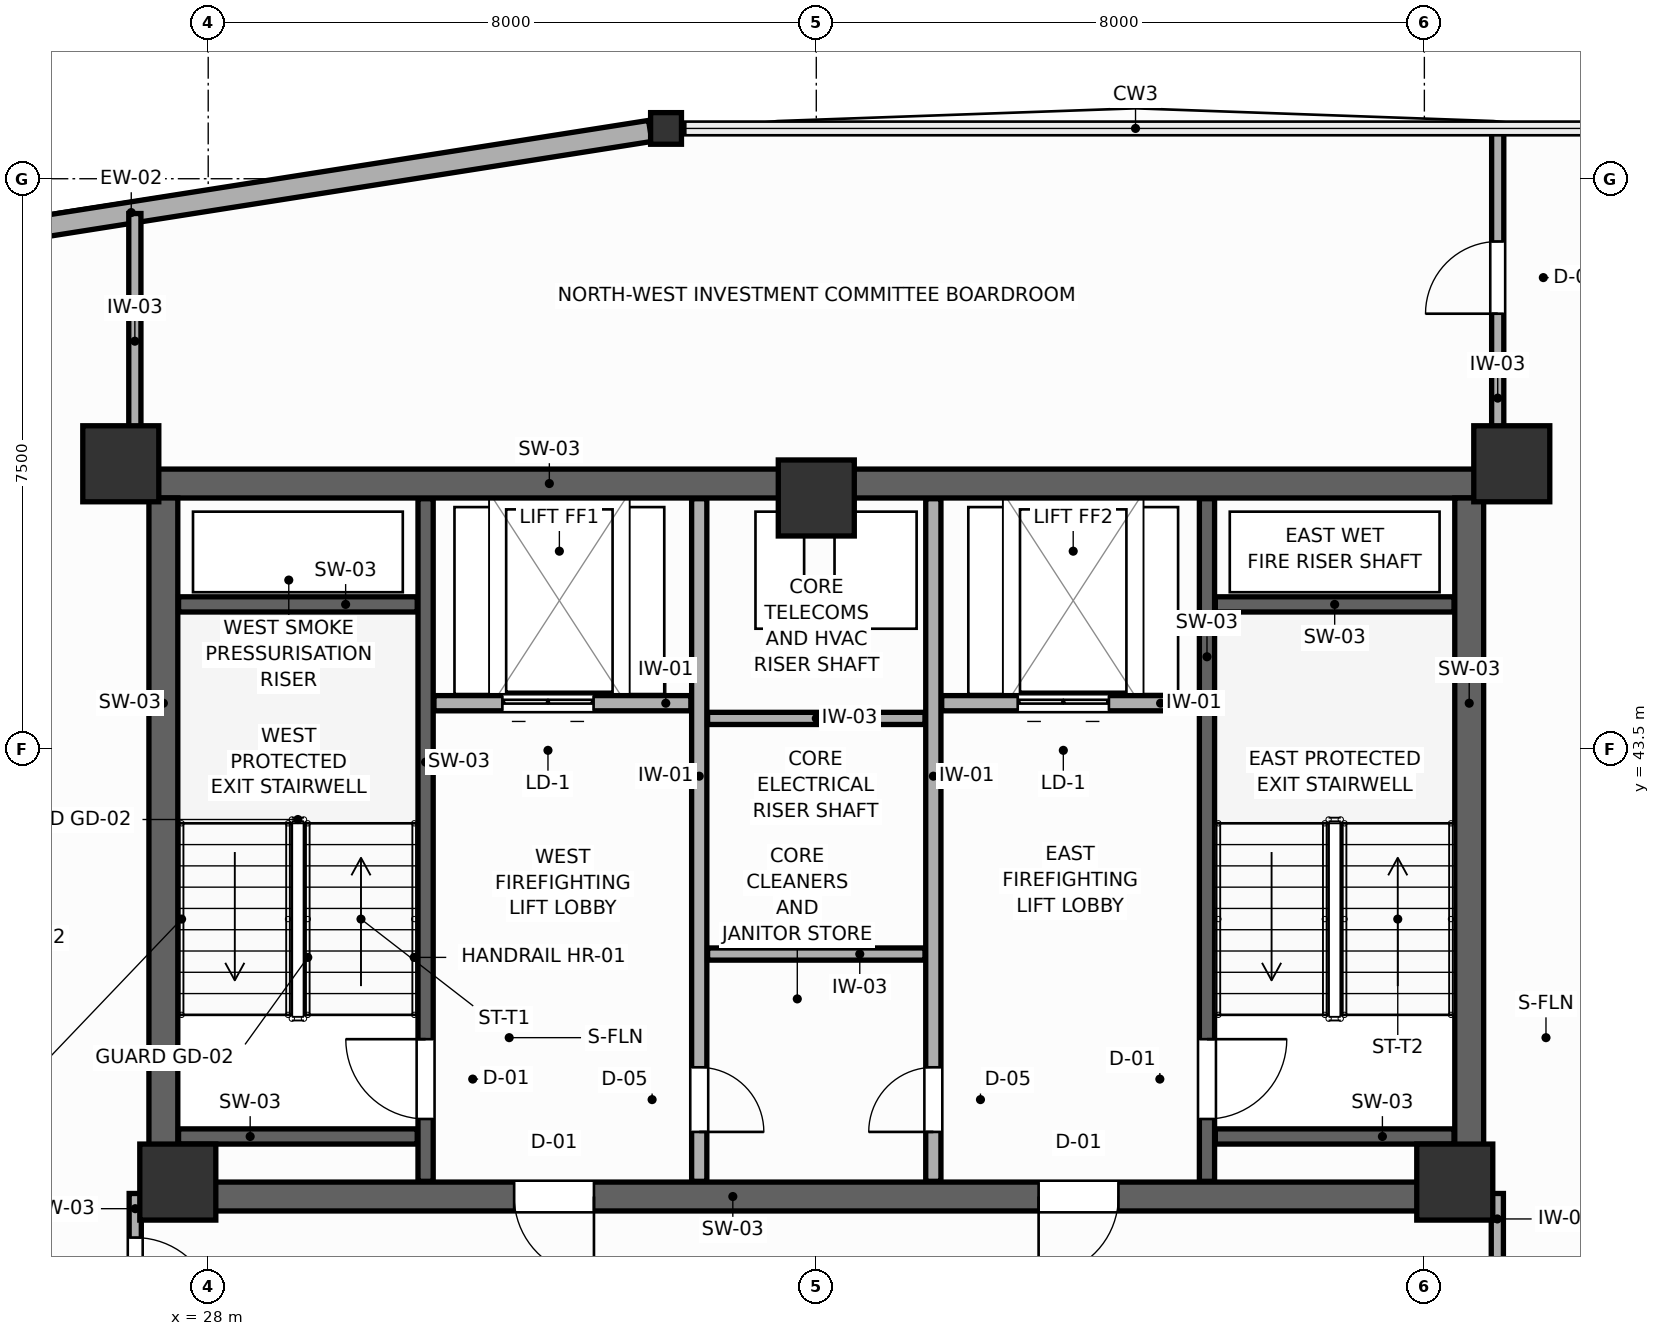
"""IFC4 building model, lengths in metres.
Left out: names, types, materials, properties, quantities, classifications, styles, units other than length and angle.
Written with IfcOpenShell. Run it as: python <this file> out.ifc"""

import sys

from ifc_helpers import new_model, si_unit, direction, frame, frame_2d, origin, origin_2d, place, context, subcontext, project, spatial, rectangle, i_section, extrude, source, transform, mapped, element, fill, save


model = new_model("IFC4")
c1 = context("Model", 3, precision=1e-05, world=origin(), true_north=direction((0.0, 1.0)))
c2 = subcontext(c1, "Body", "Model", "MODEL_VIEW")
j1 = project(units=[si_unit("LENGTHUNIT", "METRE"), si_unit("PLANEANGLEUNIT", "RADIAN")], contexts=[c1])
p1 = place(None, origin())
s1 = spatial("IfcSite", under=j1, at=p1, CompositionType="ELEMENT")
p2 = place(p1, origin())
s2 = spatial("IfcBuilding", under=s1, at=p2, CompositionType="ELEMENT")
p3 = place(p2, frame((0.0, 0.0, 213.0)))
s3 = spatial("IfcBuildingStorey", under=s2, at=p3, CompositionType="ELEMENT", Elevation=213.0)
p4 = place(p3, frame((27.22, 46.99, 0.0), z_axis=(0.0, 0.0, 1.0), x_axis=(1.0, 0.0, 0.0)))
e1 = element("IfcWall", 1, at=p4, inside=s3, PredefinedType="SHEAR", context=c2, shape_type="SweptSolid", body=[
    extrude(rectangle(XDim=17.56, YDim=0.38, at=frame_2d((8.78, 0.0))), origin(), (0.0, 0.0, 1.0), 3.6),
])
p5 = place(p3, frame((27.22, 37.61, 0.0), z_axis=(0.0, 0.0, 1.0), x_axis=(1.0, 0.0, 0.0)))
e2 = element("IfcWall", 2, at=p5, inside=s3, PredefinedType="SHEAR", context=c2, shape_type="SweptSolid", body=[
    extrude(rectangle(XDim=17.56, YDim=0.38, at=frame_2d((8.78, 0.0))), origin(), (0.0, 0.0, 1.0), 3.6),
])
p6 = place(p5, frame((4.805, 0.0, 0.0)))
e3 = element("IfcOpeningElement", 3, at=p6, cuts=e2, PredefinedType="OPENING", context=c2, shape_type="SweptSolid", body=[
    extrude(rectangle(XDim=1.05, YDim=2.1, at=frame_2d((0.525, 1.05))), frame((0.0, 0.2, 0.0), z_axis=(0.0, -1.0, 0.0), x_axis=(1.0, 0.0, 0.0)), (0.0, 0.0, 1.0), 0.4),
])
p7 = place(p5, frame((11.705, 0.0, 0.0)))
e4 = element("IfcOpeningElement", 4, at=p7, cuts=e2, PredefinedType="OPENING", context=c2, shape_type="SweptSolid", body=[
    extrude(rectangle(XDim=1.05, YDim=2.1, at=frame_2d((0.525, 1.05))), frame((0.0, 0.2, 0.0), z_axis=(0.0, -1.0, 0.0), x_axis=(1.0, 0.0, 0.0)), (0.0, 0.0, 1.0), 0.4),
])
for number, where, z_axis, x_axis in (
    (5, (27.41, 37.8, 0.0), (0.0, 0.0, 1.0), (0.0, 1.0, 0.0)),
    (6, (44.59, 37.8, 0.0), (0.0, 0.0, 1.0), (0.0, 1.0, 0.0)),
):
    element("IfcWall", number, at=place(p3, frame(where, z_axis=z_axis, x_axis=x_axis)), inside=s3, PredefinedType="SHEAR", context=c2, shape_type="SweptSolid", body=[
        extrude(rectangle(XDim=9.0, YDim=0.38, at=frame_2d((4.5, 0.0))), origin(), (0.0, 0.0, 1.0), 3.6),
    ])
m1 = source(origin(), c2, "Body", "SweptSolid", [
    extrude(rectangle(XDim=1.0, YDim=1.0, at=origin_2d()), origin(), (0.0, 0.0, 1.0), 3.6),
])
for number, where, z_axis, x_axis in (
    (7, (26.85, 47.25, 0.0), (0.0, 0.0, 1.0), (1.0, 0.0, 0.0)),
    (8, (45.15, 47.25, 0.0), (0.0, 0.0, 1.0), (1.0, 0.0, 0.0)),
    (9, (27.6, 37.8, 0.0), (0.0, 0.0, 1.0), (1.0, 0.0, 0.0)),
    (10, (44.4, 37.8, 0.0), (0.0, 0.0, 1.0), (1.0, 0.0, 0.0)),
    (11, (36.0, 46.8, 0.0), (0.0, 0.0, 1.0), (1.0, 0.0, 0.0)),
):
    element("IfcColumn", number, at=place(p3, frame(where, z_axis=z_axis, x_axis=x_axis)), inside=s3, PredefinedType="COLUMN", context=c2, shape_type="MappedRepresentation", body=[
        mapped(m1, transform((0.0, 0.0, 0.0), scale=1.0)),
    ])
m2 = source(origin(), c2, "Body", "SweptSolid", [
    extrude(i_section(OverallWidth=0.406, OverallDepth=0.416, WebThickness=0.027, FlangeThickness=0.044, FilletRadius=0.015, at=origin_2d()), origin(), (0.0, 0.0, 1.0), 3.6),
])
p8 = place(p3, frame((34.023, 51.662, 0.0), z_axis=(0.0, 0.0, 1.0), x_axis=(1.0, 0.0, 0.0)))
e12 = element("IfcColumn", 12, at=p8, inside=s3, PredefinedType="COLUMN", context=c2, shape_type="MappedRepresentation", body=[
    mapped(m2, transform((0.0, 0.0, 0.0), scale=1.0)),
])
p9 = place(p3, frame((33.815, 51.629, 0.0), z_axis=(0.0, 0.0, 1.0), x_axis=(-0.987848165878, -0.155422009936, 0.0)))
e13 = element("IfcWall", 13, at=p9, inside=s3, PredefinedType="SOLIDWALL", context=c2, shape_type="SweptSolid", body=[
    extrude(rectangle(XDim=13.823, YDim=0.28, at=frame_2d((6.912, 0.0))), origin(), (0.0, 0.0, 1.0), 1.88),
])
p10 = place(p3, frame((30.86, 37.81, 0.0), z_axis=(0.0, 0.0, 1.0), x_axis=(0.0, 1.0, 0.0)))
e14 = element("IfcWall", 14, at=p10, inside=s3, PredefinedType="SHEAR", context=c2, shape_type="SweptSolid", body=[
    extrude(rectangle(XDim=8.98, YDim=0.2, at=frame_2d((4.49, 0.0))), origin(), (0.0, 0.0, 1.0), 3.6),
])
p11 = place(p10, frame((0.82, 0.0, 0.0)))
e15 = element("IfcOpeningElement", 15, at=p11, cuts=e14, PredefinedType="OPENING", context=c2, shape_type="SweptSolid", body=[
    extrude(rectangle(XDim=1.05, YDim=2.1, at=frame_2d((0.525, 1.05))), frame((0.0, 0.11, 0.0), z_axis=(0.0, -1.0, 0.0), x_axis=(1.0, 0.0, 0.0)), (0.0, 0.0, 1.0), 0.22),
])
for number, where, z_axis, x_axis in (
    (16, (27.61, 45.4, 0.0), (0.0, 0.0, 1.0), (1.0, 0.0, 0.0)),
    (17, (27.61, 38.4, 0.0), (0.0, 0.0, 1.0), (1.0, 0.0, 0.0)),
):
    element("IfcWall", number, at=place(p3, frame(where, z_axis=z_axis, x_axis=x_axis)), inside=s3, PredefinedType="SHEAR", context=c2, shape_type="SweptSolid", body=[
        extrude(rectangle(XDim=3.14, YDim=0.2, at=frame_2d((1.57, 0.0))), origin(), (0.0, 0.0, 1.0), 3.6),
    ])
p12 = place(p3, frame((41.14, 37.81, 0.0), z_axis=(0.0, 0.0, 1.0), x_axis=(0.0, 1.0, 0.0)))
e18 = element("IfcWall", 18, at=p12, inside=s3, PredefinedType="SHEAR", context=c2, shape_type="SweptSolid", body=[
    extrude(rectangle(XDim=8.98, YDim=0.2, at=frame_2d((4.49, 0.0))), origin(), (0.0, 0.0, 1.0), 3.6),
])
p13 = place(p12, frame((0.82, 0.0, 0.0)))
e19 = element("IfcOpeningElement", 19, at=p13, cuts=e18, PredefinedType="OPENING", context=c2, shape_type="SweptSolid", body=[
    extrude(rectangle(XDim=1.05, YDim=2.1, at=frame_2d((0.525, 1.05))), frame((0.0, 0.11, 0.0), z_axis=(0.0, -1.0, 0.0), x_axis=(1.0, 0.0, 0.0)), (0.0, 0.0, 1.0), 0.22),
])
for number, where, z_axis, x_axis in (
    (20, (41.25, 45.4, 0.0), (0.0, 0.0, 1.0), (1.0, 0.0, 0.0)),
    (21, (41.25, 38.4, 0.0), (0.0, 0.0, 1.0), (1.0, 0.0, 0.0)),
):
    element("IfcWall", number, at=place(p3, frame(where, z_axis=z_axis, x_axis=x_axis)), inside=s3, PredefinedType="SHEAR", context=c2, shape_type="SweptSolid", body=[
        extrude(rectangle(XDim=3.14, YDim=0.2, at=frame_2d((1.57, 0.0))), origin(), (0.0, 0.0, 1.0), 3.6),
    ])
p14 = place(p3, frame((30.97, 44.1, 0.0), z_axis=(0.0, 0.0, 1.0), x_axis=(1.0, 0.0, 0.0)))
e22 = element("IfcWall", 22, at=p14, inside=s3, PredefinedType="PARTITIONING", context=c2, shape_type="SweptSolid", body=[
    extrude(rectangle(XDim=3.38, YDim=0.2, at=frame_2d((1.69, 0.0))), origin(), (0.0, 0.0, 1.0), 3.41),
])
p15 = place(p14, frame((0.9, 0.0, 0.0)))
e23 = element("IfcOpeningElement", 23, at=p15, cuts=e22, PredefinedType="OPENING", context=c2, shape_type="SweptSolid", body=[
    extrude(rectangle(XDim=1.2, YDim=2.1, at=frame_2d((0.6, 1.05))), frame((0.0, 0.11, 0.0), z_axis=(0.0, -1.0, 0.0), x_axis=(1.0, 0.0, 0.0)), (0.0, 0.0, 1.0), 0.22),
])
p16 = place(p3, frame((37.65, 44.1, 0.0), z_axis=(0.0, 0.0, 1.0), x_axis=(1.0, 0.0, 0.0)))
e24 = element("IfcWall", 24, at=p16, inside=s3, PredefinedType="PARTITIONING", context=c2, shape_type="SweptSolid", body=[
    extrude(rectangle(XDim=3.38, YDim=0.2, at=frame_2d((1.69, 0.0))), origin(), (0.0, 0.0, 1.0), 3.41),
])
p17 = place(p16, frame((1.0, 0.0, 0.0)))
e25 = element("IfcOpeningElement", 25, at=p17, cuts=e24, PredefinedType="OPENING", context=c2, shape_type="SweptSolid", body=[
    extrude(rectangle(XDim=1.2, YDim=2.1, at=frame_2d((0.6, 1.05))), frame((0.0, 0.11, 0.0), z_axis=(0.0, -1.0, 0.0), x_axis=(1.0, 0.0, 0.0)), (0.0, 0.0, 1.0), 0.22),
])
p18 = place(p3, frame((34.46, 37.81, 0.0), z_axis=(0.0, 0.0, 1.0), x_axis=(0.0, 1.0, 0.0)))
e26 = element("IfcWall", 26, at=p18, inside=s3, PredefinedType="PARTITIONING", context=c2, shape_type="SweptSolid", body=[
    extrude(rectangle(XDim=8.98, YDim=0.2, at=frame_2d((4.49, 0.0))), origin(), (0.0, 0.0, 1.0), 3.41),
])
p19 = place(p18, frame((0.65, 0.0, 0.0)))
e27 = element("IfcOpeningElement", 27, at=p19, cuts=e26, PredefinedType="OPENING", context=c2, shape_type="SweptSolid", body=[
    extrude(rectangle(XDim=0.85, YDim=2.05, at=frame_2d((0.425, 1.025))), frame((0.0, 0.11, 0.0), z_axis=(0.0, -1.0, 0.0), x_axis=(1.0, 0.0, 0.0)), (0.0, 0.0, 1.0), 0.22),
])
p20 = place(p3, frame((37.54, 37.81, 0.0), z_axis=(0.0, 0.0, 1.0), x_axis=(0.0, 1.0, 0.0)))
e28 = element("IfcWall", 28, at=p20, inside=s3, PredefinedType="PARTITIONING", context=c2, shape_type="SweptSolid", body=[
    extrude(rectangle(XDim=8.98, YDim=0.2, at=frame_2d((4.49, 0.0))), origin(), (0.0, 0.0, 1.0), 3.41),
])
p21 = place(p20, frame((0.65, 0.0, 0.0)))
e29 = element("IfcOpeningElement", 29, at=p21, cuts=e28, PredefinedType="OPENING", context=c2, shape_type="SweptSolid", body=[
    extrude(rectangle(XDim=0.85, YDim=2.05, at=frame_2d((0.425, 1.025))), frame((0.0, 0.11, 0.0), z_axis=(0.0, -1.0, 0.0), x_axis=(1.0, 0.0, 0.0)), (0.0, 0.0, 1.0), 0.22),
])
for number, where, z_axis, x_axis in (
    (30, (34.57, 40.8, 0.0), (0.0, 0.0, 1.0), (1.0, 0.0, 0.0)),
    (31, (34.57, 43.9, 0.0), (0.0, 0.0, 1.0), (1.0, 0.0, 0.0)),
):
    element("IfcWall", number, at=place(p3, frame(where, z_axis=z_axis, x_axis=x_axis)), inside=s3, PredefinedType="PARTITIONING", context=c2, shape_type="SweptSolid", body=[
        extrude(rectangle(XDim=2.86, YDim=0.16, at=frame_2d((1.43, 0.0))), origin(), (0.0, 0.0, 1.0), 3.41),
    ])
p22 = place(p3, frame((27.04, 35.54, 0.0), z_axis=(0.0, 0.0, 1.0), x_axis=(0.0, 1.0, 0.0)))
e32 = element("IfcWall", 32, at=p22, inside=s3, PredefinedType="PARTITIONING", context=c2, shape_type="SweptSolid", body=[
    extrude(rectangle(XDim=2.11, YDim=0.16, at=frame_2d((1.055, 0.0))), origin(), (0.0, 0.0, 1.0), 3.41),
])
p23 = place(p22, frame((0.48, 0.0, 0.0)))
e33 = element("IfcOpeningElement", 33, at=p23, cuts=e32, PredefinedType="OPENING", context=c2, shape_type="SweptSolid", body=[
    extrude(rectangle(XDim=1.05, YDim=2.1, at=frame_2d((0.525, 1.05))), frame((0.0, 0.09, 0.0), z_axis=(0.0, -1.0, 0.0), x_axis=(1.0, 0.0, 0.0)), (0.0, 0.0, 1.0), 0.18),
])
p24 = place(p3, frame((44.96, 35.0, 0.0), z_axis=(0.0, 0.0, 1.0), x_axis=(0.0, 1.0, 0.0)))
e34 = element("IfcWall", 34, at=p24, inside=s3, PredefinedType="PARTITIONING", context=c2, shape_type="SweptSolid", body=[
    extrude(rectangle(XDim=2.65, YDim=0.16, at=frame_2d((1.325, 0.0))), origin(), (0.0, 0.0, 1.0), 3.41),
])
p25 = place(p24, frame((0.75, 0.0, 0.0)))
e35 = element("IfcOpeningElement", 35, at=p25, cuts=e34, PredefinedType="OPENING", context=c2, shape_type="SweptSolid", body=[
    extrude(rectangle(XDim=1.05, YDim=2.1, at=frame_2d((0.525, 1.05))), frame((0.0, 0.09, 0.0), z_axis=(0.0, -1.0, 0.0), x_axis=(1.0, 0.0, 0.0)), (0.0, 0.0, 1.0), 0.18),
])
p26 = place(p3, frame((44.965, 47.183, 0.0), z_axis=(0.0, 0.0, 1.0), x_axis=(0.0, 1.0, 0.0)))
e36 = element("IfcWall", 36, at=p26, inside=s3, PredefinedType="PARTITIONING", context=c2, shape_type="SweptSolid", body=[
    extrude(rectangle(XDim=4.458, YDim=0.16, at=frame_2d((2.229, 0.0))), origin(), (0.0, 0.0, 1.0), 2.17),
])
p27 = place(p26, frame((2.041, 0.0, 0.0)))
e37 = element("IfcOpeningElement", 37, at=p27, cuts=e36, PredefinedType="OPENING", context=c2, shape_type="SweptSolid", body=[
    extrude(rectangle(XDim=0.95, YDim=2.05, at=frame_2d((0.475, 1.025))), frame((0.0, 0.09, 0.0), z_axis=(0.0, -1.0, 0.0), x_axis=(1.0, 0.0, 0.0)), (0.0, 0.0, 1.0), 0.18),
])
p28 = place(p3, frame((27.035, 47.183, 0.0), z_axis=(0.0, 0.0, 1.0), x_axis=(0.0, 1.0, 0.0)))
e38 = element("IfcWall", 38, at=p28, inside=s3, PredefinedType="PARTITIONING", context=c2, shape_type="SweptSolid", body=[
    extrude(rectangle(XDim=3.359, YDim=0.16, at=frame_2d((1.68, 0.0))), origin(), (0.0, 0.0, 1.0), 3.41),
])
p29 = place(p11, origin())
e39 = element("IfcDoor", 39, at=p29, inside=s3, OperationType="SINGLE_SWING_RIGHT", PredefinedType="DOOR", context=c2, shape_type="SweptSolid", body=[
    extrude(rectangle(XDim=1.05, YDim=2.1, at=frame_2d((0.525, 1.05))), frame((0.0, 0.025, 0.0), z_axis=(0.0, -1.0, 0.0), x_axis=(1.0, 0.0, 0.0)), (0.0, 0.0, 1.0), 0.05),
])
fill(e15, e39)
p30 = place(p13, frame((1.05, 0.0, 0.0), z_axis=(0.0, 0.0, 1.0), x_axis=(-1.0, 0.0, 0.0)))
e40 = element("IfcDoor", 40, at=p30, inside=s3, OperationType="SINGLE_SWING_LEFT", PredefinedType="DOOR", context=c2, shape_type="SweptSolid", body=[
    extrude(rectangle(XDim=1.05, YDim=2.1, at=frame_2d((0.525, 1.05))), frame((0.0, 0.025, 0.0), z_axis=(0.0, -1.0, 0.0), x_axis=(1.0, 0.0, 0.0)), (0.0, 0.0, 1.0), 0.05),
])
fill(e19, e40)
p31 = place(p15, origin())
e41 = element("IfcDoor", 41, at=p31, inside=s3, OperationType="DOUBLE_DOOR_SLIDING", PredefinedType="DOOR", context=c2, shape_type="SweptSolid", body=[
    extrude(rectangle(XDim=1.2, YDim=2.1, at=frame_2d((0.6, 1.05))), frame((0.0, 0.025, 0.0), z_axis=(0.0, -1.0, 0.0), x_axis=(1.0, 0.0, 0.0)), (0.0, 0.0, 1.0), 0.05),
])
fill(e23, e41)
p32 = place(p17, origin())
e42 = element("IfcDoor", 42, at=p32, inside=s3, OperationType="DOUBLE_DOOR_SLIDING", PredefinedType="DOOR", context=c2, shape_type="SweptSolid", body=[
    extrude(rectangle(XDim=1.2, YDim=2.1, at=frame_2d((0.6, 1.05))), frame((0.0, 0.025, 0.0), z_axis=(0.0, -1.0, 0.0), x_axis=(1.0, 0.0, 0.0)), (0.0, 0.0, 1.0), 0.05),
])
fill(e25, e42)
p33 = place(p19, frame((0.85, 0.0, 0.0), z_axis=(0.0, 0.0, 1.0), x_axis=(-1.0, 0.0, 0.0)))
e43 = element("IfcDoor", 43, at=p33, inside=s3, OperationType="SINGLE_SWING_RIGHT", PredefinedType="DOOR", context=c2, shape_type="SweptSolid", body=[
    extrude(rectangle(XDim=0.85, YDim=2.05, at=frame_2d((0.425, 1.025))), frame((0.0, 0.025, 0.0), z_axis=(0.0, -1.0, 0.0), x_axis=(1.0, 0.0, 0.0)), (0.0, 0.0, 1.0), 0.05),
])
fill(e27, e43)
p34 = place(p21, origin())
e44 = element("IfcDoor", 44, at=p34, inside=s3, OperationType="SINGLE_SWING_LEFT", PredefinedType="DOOR", context=c2, shape_type="SweptSolid", body=[
    extrude(rectangle(XDim=0.85, YDim=2.05, at=frame_2d((0.425, 1.025))), frame((0.0, 0.025, 0.0), z_axis=(0.0, -1.0, 0.0), x_axis=(1.0, 0.0, 0.0)), (0.0, 0.0, 1.0), 0.05),
])
fill(e29, e44)
p35 = place(p23, frame((1.05, 0.0, 0.0), z_axis=(0.0, 0.0, 1.0), x_axis=(-1.0, 0.0, 0.0)))
e45 = element("IfcDoor", 45, at=p35, inside=s3, OperationType="SINGLE_SWING_RIGHT", PredefinedType="DOOR", context=c2, shape_type="SweptSolid", body=[
    extrude(rectangle(XDim=1.05, YDim=2.1, at=frame_2d((0.525, 1.05))), frame((0.0, 0.025, 0.0), z_axis=(0.0, -1.0, 0.0), x_axis=(1.0, 0.0, 0.0)), (0.0, 0.0, 1.0), 0.05),
])
fill(e33, e45)
p36 = place(p27, origin())
e46 = element("IfcDoor", 46, at=p36, inside=s3, OperationType="SINGLE_SWING_LEFT", PredefinedType="DOOR", context=c2, shape_type="SweptSolid", body=[
    extrude(rectangle(XDim=0.95, YDim=2.05, at=frame_2d((0.475, 1.025))), frame((0.0, 0.025, 0.0), z_axis=(0.0, -1.0, 0.0), x_axis=(1.0, 0.0, 0.0)), (0.0, 0.0, 1.0), 0.05),
])
fill(e37, e46)
p37 = place(p6, frame((1.05, 0.0, 0.0), z_axis=(0.0, 0.0, 1.0), x_axis=(-1.0, 0.0, 0.0)))
e47 = element("IfcDoor", 47, at=p37, inside=s3, OperationType="SINGLE_SWING_LEFT", PredefinedType="DOOR", context=c2, shape_type="SweptSolid", body=[
    extrude(rectangle(XDim=1.05, YDim=2.1, at=frame_2d((0.525, 1.05))), frame((0.0, 0.025, 0.0), z_axis=(0.0, -1.0, 0.0), x_axis=(1.0, 0.0, 0.0)), (0.0, 0.0, 1.0), 0.05),
])
fill(e3, e47)
p38 = place(p7, frame((1.05, 0.0, 0.0), z_axis=(0.0, 0.0, 1.0), x_axis=(-1.0, 0.0, 0.0)))
e48 = element("IfcDoor", 48, at=p38, inside=s3, OperationType="SINGLE_SWING_RIGHT", PredefinedType="DOOR", context=c2, shape_type="SweptSolid", body=[
    extrude(rectangle(XDim=1.05, YDim=2.1, at=frame_2d((0.525, 1.05))), frame((0.0, 0.025, 0.0), z_axis=(0.0, -1.0, 0.0), x_axis=(1.0, 0.0, 0.0)), (0.0, 0.0, 1.0), 0.05),
])
fill(e4, e48)
save(model, sys.argv[1])
